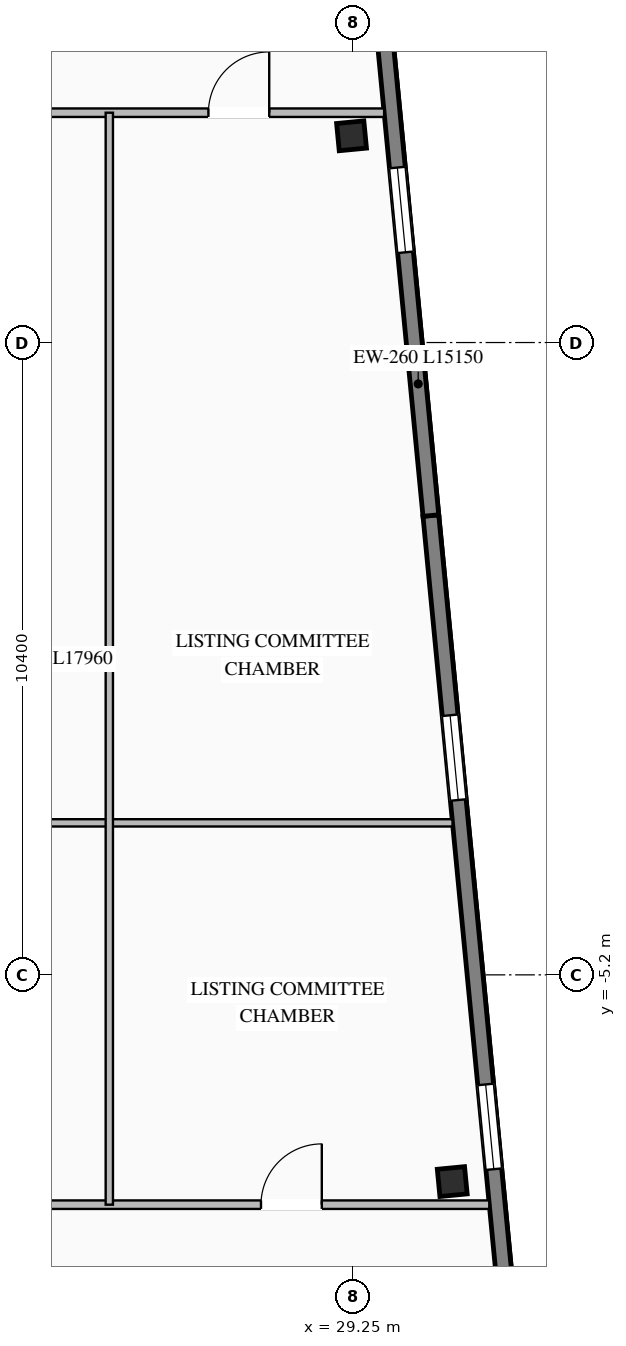
"""IFC4 building model, lengths in metres.
Left out: names, types, materials, properties, quantities, classifications, styles, units other than length and angle.
Written with IfcOpenShell. Run it as: python <this file> out.ifc"""

import sys

from ifc_helpers import new_model, si_unit, direction, frame, frame_2d, origin, origin_2d, place, context, subcontext, project, spatial, rectangle, i_section, extrude, element, fill, save


model = new_model("IFC4")
c1 = context("Model", 3, precision=1e-05, world=origin(), true_north=direction((0.0, 1.0)))
c2 = subcontext(c1, "Body", "Model", "MODEL_VIEW")
j1 = project(units=[si_unit("LENGTHUNIT", "METRE"), si_unit("PLANEANGLEUNIT", "RADIAN")], contexts=[c1])
p1 = place(None, origin())
s1 = spatial("IfcSite", under=j1, at=p1, CompositionType="ELEMENT")
p2 = place(p1, origin())
s2 = spatial("IfcBuilding", under=s1, at=p2, CompositionType="ELEMENT")
p3 = place(p2, frame((0.0, 0.0, 251.7)))
s3 = spatial("IfcBuildingStorey", under=s2, at=p3, CompositionType="ELEMENT", Elevation=251.7)
for number, where, z_axis, x_axis in (
    (1, (30.879, -8.6, 0.0), (0.0, 0.0, 1.0), (0.995, 0.096, 0.0)),
    (2, (29.223, 8.6, 0.0), (0.0, 0.0, 1.0), (0.995, 0.096, 0.0)),
):
    element("IfcColumn", number, at=place(p3, frame(where, z_axis=z_axis, x_axis=x_axis)), inside=s3, PredefinedType="COLUMN", context=c2, shape_type="SweptSolid", body=[
        extrude(i_section(OverallWidth=0.45, OverallDepth=0.45, WebThickness=0.022, FlangeThickness=0.032, at=origin_2d()), origin(), (0.0, 0.0, 1.0), 3.45),
    ])
p4 = place(p3, frame((30.527, 2.354, 0.0), z_axis=(0.0, 0.0, 1.0), x_axis=(0.095850890337, -0.995395703638, 0.0)))
e3 = element("IfcWall", 3, at=p4, inside=s3, PredefinedType="STANDARD", context=c2, shape_type="SweptSolid", body=[
    extrude(rectangle(XDim=15.15, YDim=0.26, at=frame_2d((7.575, 0.0))), origin(), (0.0, 0.0, 1.0), 3.25),
])
p5 = place(p4, frame((3.3, 0.0, 0.76)))
e4 = element("IfcOpeningElement", 4, at=p5, cuts=e3, PredefinedType="OPENING", context=c2, shape_type="SweptSolid", body=[
    extrude(rectangle(XDim=1.4, YDim=1.95, at=frame_2d((0.7, 0.975))), frame((0.0, 0.14, 0.0), z_axis=(0.0, -1.0, 0.0), x_axis=(1.0, 0.0, 0.0)), (0.0, 0.0, 1.0), 0.28),
])
p6 = place(p4, frame((9.4, 0.0, 0.76)))
e5 = element("IfcOpeningElement", 5, at=p6, cuts=e3, PredefinedType="OPENING", context=c2, shape_type="SweptSolid", body=[
    extrude(rectangle(XDim=1.4, YDim=1.95, at=frame_2d((0.7, 0.975))), frame((0.0, 0.14, 0.0), z_axis=(0.0, -1.0, 0.0), x_axis=(1.0, 0.0, 0.0)), (0.0, 0.0, 1.0), 0.28),
])
p7 = place(p3, frame((29.075, 17.435, 0.0), z_axis=(0.0, 0.0, 1.0), x_axis=(0.095850890337, -0.995395703638, 0.0)))
e6 = element("IfcWall", 6, at=p7, inside=s3, PredefinedType="STANDARD", context=c2, shape_type="SweptSolid", body=[
    extrude(rectangle(XDim=15.15, YDim=0.26, at=frame_2d((7.575, 0.0))), origin(), (0.0, 0.0, 1.0), 3.25),
])
p8 = place(p7, frame((4.35, 0.0, 0.76)))
e7 = element("IfcOpeningElement", 7, at=p8, cuts=e6, PredefinedType="OPENING", context=c2, shape_type="SweptSolid", body=[
    extrude(rectangle(XDim=1.4, YDim=1.95, at=frame_2d((0.7, 0.975))), frame((0.0, 0.14, 0.0), z_axis=(0.0, -1.0, 0.0), x_axis=(1.0, 0.0, 0.0)), (0.0, 0.0, 1.0), 0.28),
])
p9 = place(p7, frame((9.4, 0.0, 0.76)))
e8 = element("IfcOpeningElement", 8, at=p9, cuts=e6, PredefinedType="OPENING", context=c2, shape_type="SweptSolid", body=[
    extrude(rectangle(XDim=1.4, YDim=1.95, at=frame_2d((0.7, 0.975))), frame((0.0, 0.14, 0.0), z_axis=(0.0, -1.0, 0.0), x_axis=(1.0, 0.0, 0.0)), (0.0, 0.0, 1.0), 0.28),
])
p10 = place(p3, frame((19.05, 8.98, 0.0), z_axis=(0.0, 0.0, 1.0), x_axis=(1.0, 0.0, 0.0)))
e9 = element("IfcWall", 9, at=p10, inside=s3, PredefinedType="STANDARD", context=c2, shape_type="SweptSolid", body=[
    extrude(rectangle(XDim=10.709, YDim=0.14, at=frame_2d((5.354, 0.0))), origin(), (0.0, 0.0, 1.0), 3.25),
])
p11 = place(p10, frame((2.725, 0.0, 0.0)))
e10 = element("IfcOpeningElement", 10, at=p11, cuts=e9, PredefinedType="OPENING", context=c2, shape_type="SweptSolid", body=[
    extrude(rectangle(XDim=1.0, YDim=2.08, at=frame_2d((0.5, 1.04))), frame((0.0, 0.08, 0.0), z_axis=(0.0, -1.0, 0.0), x_axis=(1.0, 0.0, 0.0)), (0.0, 0.0, 1.0), 0.16),
])
p12 = place(p10, frame((7.819, 0.0, 0.0)))
e11 = element("IfcOpeningElement", 11, at=p12, cuts=e9, PredefinedType="OPENING", context=c2, shape_type="SweptSolid", body=[
    extrude(rectangle(XDim=1.0, YDim=2.08, at=frame_2d((0.5, 1.04))), frame((0.0, 0.08, 0.0), z_axis=(0.0, -1.0, 0.0), x_axis=(1.0, 0.0, 0.0)), (0.0, 0.0, 1.0), 0.16),
])
p13 = place(p3, frame((19.05, -8.98, 0.0), z_axis=(0.0, 0.0, 1.0), x_axis=(1.0, 0.0, 0.0)))
e12 = element("IfcWall", 12, at=p13, inside=s3, PredefinedType="STANDARD", context=c2, shape_type="SweptSolid", body=[
    extrude(rectangle(XDim=12.438, YDim=0.14, at=frame_2d((6.219, 0.0))), origin(), (0.0, 0.0, 1.0), 3.25),
])
p14 = place(p13, frame((2.725, 0.0, 0.0)))
e13 = element("IfcOpeningElement", 13, at=p14, cuts=e12, PredefinedType="OPENING", context=c2, shape_type="SweptSolid", body=[
    extrude(rectangle(XDim=1.0, YDim=2.08, at=frame_2d((0.5, 1.04))), frame((0.0, 0.08, 0.0), z_axis=(0.0, -1.0, 0.0), x_axis=(1.0, 0.0, 0.0)), (0.0, 0.0, 1.0), 0.16),
])
p15 = place(p13, frame((8.684, 0.0, 0.0)))
e14 = element("IfcOpeningElement", 14, at=p15, cuts=e12, PredefinedType="OPENING", context=c2, shape_type="SweptSolid", body=[
    extrude(rectangle(XDim=1.0, YDim=2.08, at=frame_2d((0.5, 1.04))), frame((0.0, 0.08, 0.0), z_axis=(0.0, -1.0, 0.0), x_axis=(1.0, 0.0, 0.0)), (0.0, 0.0, 1.0), 0.16),
])
p16 = place(p3, frame((19.05, -2.7, 0.0), z_axis=(0.0, 0.0, 1.0), x_axis=(1.0, 0.0, 0.0)))
e15 = element("IfcWall", 15, at=p16, inside=s3, PredefinedType="STANDARD", context=c2, shape_type="SweptSolid", body=[
    extrude(rectangle(XDim=11.833, YDim=0.12, at=frame_2d((5.917, 0.0))), origin(), (0.0, 0.0, 1.0), 3.25),
])
p17 = place(p3, frame((25.239, -8.98, 0.0), z_axis=(0.0, 0.0, 1.0), x_axis=(0.0, 1.0, 0.0)))
e16 = element("IfcWall", 16, at=p17, inside=s3, PredefinedType="STANDARD", context=c2, shape_type="SweptSolid", body=[
    extrude(rectangle(XDim=17.96, YDim=0.12, at=frame_2d((8.98, 0.0))), origin(), (0.0, 0.0, 1.0), 3.25),
])
p18 = place(p5, origin())
e17 = element("IfcWindow", 17, at=p18, inside=s3, PartitioningType="SINGLE_PANEL", PredefinedType="WINDOW", context=c2, shape_type="SweptSolid", body=[
    extrude(rectangle(XDim=1.4, YDim=1.95, at=frame_2d((0.7, 0.975))), frame((0.0, 0.03, 0.0), z_axis=(0.0, -1.0, 0.0), x_axis=(1.0, 0.0, 0.0)), (0.0, 0.0, 1.0), 0.06),
])
fill(e4, e17)
p19 = place(p6, origin())
e18 = element("IfcWindow", 18, at=p19, inside=s3, PartitioningType="SINGLE_PANEL", PredefinedType="WINDOW", context=c2, shape_type="SweptSolid", body=[
    extrude(rectangle(XDim=1.4, YDim=1.95, at=frame_2d((0.7, 0.975))), frame((0.0, 0.03, 0.0), z_axis=(0.0, -1.0, 0.0), x_axis=(1.0, 0.0, 0.0)), (0.0, 0.0, 1.0), 0.06),
])
fill(e5, e18)
p20 = place(p9, origin())
e19 = element("IfcWindow", 19, at=p20, inside=s3, PartitioningType="SINGLE_PANEL", PredefinedType="WINDOW", context=c2, shape_type="SweptSolid", body=[
    extrude(rectangle(XDim=1.4, YDim=1.95, at=frame_2d((0.7, 0.975))), frame((0.0, 0.03, 0.0), z_axis=(0.0, -1.0, 0.0), x_axis=(1.0, 0.0, 0.0)), (0.0, 0.0, 1.0), 0.06),
])
fill(e8, e19)
p21 = place(p12, origin())
e20 = element("IfcDoor", 20, at=p21, inside=s3, OperationType="SINGLE_SWING_RIGHT", PredefinedType="DOOR", context=c2, shape_type="SweptSolid", body=[
    extrude(rectangle(XDim=1.0, YDim=2.08, at=frame_2d((0.5, 1.04))), frame((0.0, 0.025, 0.0), z_axis=(0.0, -1.0, 0.0), x_axis=(1.0, 0.0, 0.0)), (0.0, 0.0, 1.0), 0.05),
])
fill(e11, e20)
p22 = place(p15, origin())
e21 = element("IfcDoor", 21, at=p22, inside=s3, OperationType="SINGLE_SWING_RIGHT", PredefinedType="DOOR", context=c2, shape_type="SweptSolid", body=[
    extrude(rectangle(XDim=1.0, YDim=2.08, at=frame_2d((0.5, 1.04))), frame((0.0, 0.025, 0.0), z_axis=(0.0, -1.0, 0.0), x_axis=(1.0, 0.0, 0.0)), (0.0, 0.0, 1.0), 0.05),
])
fill(e14, e21)
save(model, sys.argv[1])
